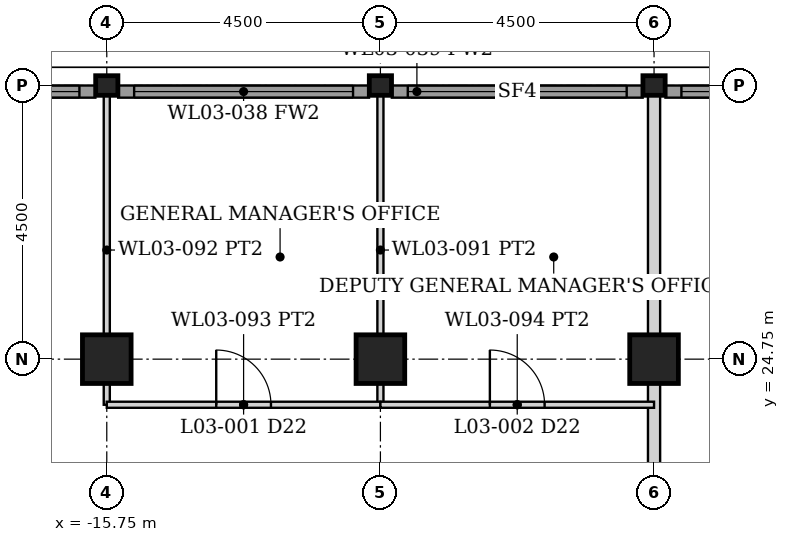
"""IFC4 building model, lengths in metres.
Left out: names, types, materials, properties, quantities, classifications, styles, units other than length and angle.
Written with IfcOpenShell. Run it as: python <this file> out.ifc"""

import sys

from ifc_helpers import new_model, si_unit, direction, frame, frame_2d, origin, origin_2d, place, context, subcontext, project, spatial, rectangle, hollow_rectangle, i_section, extrude, element, fill, save


model = new_model("IFC4")
c1 = context("Model", 3, precision=1e-05, world=origin(), true_north=direction((0.0, 1.0)))
c2 = subcontext(c1, "Body", "Model", "MODEL_VIEW")
j1 = project(units=[si_unit("LENGTHUNIT", "METRE"), si_unit("PLANEANGLEUNIT", "RADIAN")], contexts=[c1])
p1 = place(None, origin())
s1 = spatial("IfcSite", under=j1, at=p1, CompositionType="ELEMENT")
p2 = place(p1, origin())
s2 = spatial("IfcBuilding", under=s1, at=p2, CompositionType="ELEMENT")
p3 = place(p2, frame((0.0, 0.0, 16.0)))
s3 = spatial("IfcBuildingStorey", under=s2, at=p3, CompositionType="ELEMENT", Elevation=16.0)
for number, where, z_axis, x_axis in (
    (1, (-15.75, 24.75, 0.0), (0.0, 0.0, 1.0), (0.0, 1.0, 0.0)),
    (2, (-11.25, 24.75, 0.0), (0.0, 0.0, 1.0), (0.0, 1.0, 0.0)),
    (3, (-6.75, 24.75, 0.0), (0.0, 0.0, 1.0), (0.0, 1.0, 0.0)),
):
    element("IfcColumn", number, at=place(p3, frame(where, z_axis=z_axis, x_axis=x_axis)), inside=s3, PredefinedType="COLUMN", context=c2, shape_type="SweptSolid", body=[
        extrude(hollow_rectangle(XDim=0.8, YDim=0.8, WallThickness=0.08, at=origin_2d()), origin(), (0.0, 0.0, 1.0), 5.5),
    ])
for number, where, z_axis, x_axis in (
    (4, (-15.75, 29.25, 0.0), (0.0, 0.0, 1.0), (0.0, 1.0, 0.0)),
    (5, (-11.25, 29.25, 0.0), (0.0, 0.0, 1.0), (0.0, 1.0, 0.0)),
    (6, (-6.75, 29.25, 0.0), (0.0, 0.0, 1.0), (0.0, 1.0, 0.0)),
):
    element("IfcColumn", number, at=place(p3, frame(where, z_axis=z_axis, x_axis=x_axis)), inside=s3, PredefinedType="COLUMN", context=c2, shape_type="SweptSolid", body=[
        extrude(i_section(OverallWidth=0.322, OverallDepth=0.365, WebThickness=0.027, FlangeThickness=0.044, FilletRadius=0.015, at=origin_2d()), origin(), (0.0, 0.0, 1.0), 5.5),
    ])
p4 = place(p3, frame((-20.062, 29.15, 0.0), z_axis=(0.0, 0.0, 1.0), x_axis=(1.0, 0.0, 0.0)))
e7 = element("IfcWall", 7, at=p4, inside=s3, PredefinedType="SOLIDWALL", context=c2, shape_type="SweptSolid", body=[
    extrude(rectangle(XDim=4.125, YDim=0.2, at=frame_2d((2.062, 0.0))), origin(), (0.0, 0.0, 1.0), 4.633),
])
p5 = place(p4, frame((0.262, 0.0, 0.15)))
e8 = element("IfcOpeningElement", 8, at=p5, cuts=e7, PredefinedType="OPENING", context=c2, shape_type="SweptSolid", body=[
    extrude(rectangle(XDim=3.6, YDim=4.333, at=frame_2d((1.8, 2.167))), frame((0.0, 0.11, 0.0), z_axis=(0.0, -1.0, 0.0), x_axis=(1.0, 0.0, 0.0)), (0.0, 0.0, 1.0), 0.22),
])
p6 = place(p3, frame((-15.562, 29.15, 0.0), z_axis=(0.0, 0.0, 1.0), x_axis=(1.0, 0.0, 0.0)))
e9 = element("IfcWall", 9, at=p6, inside=s3, PredefinedType="SOLIDWALL", context=c2, shape_type="SweptSolid", body=[
    extrude(rectangle(XDim=4.125, YDim=0.2, at=frame_2d((2.062, 0.0))), origin(), (0.0, 0.0, 1.0), 4.633),
])
p7 = place(p6, frame((0.262, 0.0, 0.15)))
e10 = element("IfcOpeningElement", 10, at=p7, cuts=e9, PredefinedType="OPENING", context=c2, shape_type="SweptSolid", body=[
    extrude(rectangle(XDim=3.6, YDim=4.333, at=frame_2d((1.8, 2.167))), frame((0.0, 0.11, 0.0), z_axis=(0.0, -1.0, 0.0), x_axis=(1.0, 0.0, 0.0)), (0.0, 0.0, 1.0), 0.22),
])
p8 = place(p3, frame((-11.062, 29.15, 0.0), z_axis=(0.0, 0.0, 1.0), x_axis=(1.0, 0.0, 0.0)))
e11 = element("IfcWall", 11, at=p8, inside=s3, PredefinedType="SOLIDWALL", context=c2, shape_type="SweptSolid", body=[
    extrude(rectangle(XDim=4.125, YDim=0.2, at=frame_2d((2.062, 0.0))), origin(), (0.0, 0.0, 1.0), 4.633),
])
p9 = place(p8, frame((0.262, 0.0, 0.15)))
e12 = element("IfcOpeningElement", 12, at=p9, cuts=e11, PredefinedType="OPENING", context=c2, shape_type="SweptSolid", body=[
    extrude(rectangle(XDim=3.6, YDim=4.333, at=frame_2d((1.8, 2.167))), frame((0.0, 0.11, 0.0), z_axis=(0.0, -1.0, 0.0), x_axis=(1.0, 0.0, 0.0)), (0.0, 0.0, 1.0), 0.22),
])
p10 = place(p3, frame((-6.562, 29.15, 0.0), z_axis=(0.0, 0.0, 1.0), x_axis=(1.0, 0.0, 0.0)))
e13 = element("IfcWall", 13, at=p10, inside=s3, PredefinedType="SOLIDWALL", context=c2, shape_type="SweptSolid", body=[
    extrude(rectangle(XDim=4.125, YDim=0.2, at=frame_2d((2.062, 0.0))), origin(), (0.0, 0.0, 1.0), 4.633),
])
p11 = place(p10, frame((0.262, 0.0, 0.15)))
e14 = element("IfcOpeningElement", 14, at=p11, cuts=e13, PredefinedType="OPENING", context=c2, shape_type="SweptSolid", body=[
    extrude(rectangle(XDim=3.6, YDim=4.333, at=frame_2d((1.8, 2.167))), frame((0.0, 0.11, 0.0), z_axis=(0.0, -1.0, 0.0), x_axis=(1.0, 0.0, 0.0)), (0.0, 0.0, 1.0), 0.22),
])
p12 = place(p3, frame((-6.75, 9.2, 0.0), z_axis=(0.0, 0.0, 1.0), x_axis=(0.0, 1.0, 0.0)))
e15 = element("IfcWall", 15, at=p12, inside=s3, PredefinedType="PARTITIONING", context=c2, shape_type="SweptSolid", body=[
    extrude(rectangle(XDim=19.889, YDim=0.2, at=frame_2d((9.944, 0.0))), origin(), (0.0, 0.0, 1.0), 4.329),
])
for number, where, z_axis, x_axis in (
    (16, (-15.75, 24.0, 0.0), (0.0, 0.0, 1.0), (0.0, 1.0, 0.0)),
    (17, (-11.25, 24.0, 0.0), (0.0, 0.0, 1.0), (0.0, 1.0, 0.0)),
):
    element("IfcWall", number, at=place(p3, frame(where, z_axis=z_axis, x_axis=x_axis)), inside=s3, PredefinedType="PARTITIONING", context=c2, shape_type="SweptSolid", body=[
        extrude(rectangle(XDim=5.089, YDim=0.1, at=frame_2d((2.544, 0.0))), origin(), (0.0, 0.0, 1.0), 4.329),
    ])
p13 = place(p3, frame((-15.75, 24.0, 0.0), z_axis=(0.0, 0.0, 1.0), x_axis=(1.0, 0.0, 0.0)))
e18 = element("IfcWall", 18, at=p13, inside=s3, PredefinedType="PARTITIONING", context=c2, shape_type="SweptSolid", body=[
    extrude(rectangle(XDim=4.5, YDim=0.1, at=frame_2d((2.25, 0.0))), origin(), (0.0, 0.0, 1.0), 4.329),
])
p14 = place(p13, frame((1.8, 0.0, 0.0)))
e19 = element("IfcOpeningElement", 19, at=p14, cuts=e18, PredefinedType="OPENING", context=c2, shape_type="SweptSolid", body=[
    extrude(rectangle(XDim=0.9, YDim=2.1, at=frame_2d((0.45, 1.05))), frame((0.0, 0.06, 0.0), z_axis=(0.0, -1.0, 0.0), x_axis=(1.0, 0.0, 0.0)), (0.0, 0.0, 1.0), 0.12),
])
p15 = place(p3, frame((-11.25, 24.0, 0.0), z_axis=(0.0, 0.0, 1.0), x_axis=(1.0, 0.0, 0.0)))
e20 = element("IfcWall", 20, at=p15, inside=s3, PredefinedType="PARTITIONING", context=c2, shape_type="SweptSolid", body=[
    extrude(rectangle(XDim=4.5, YDim=0.1, at=frame_2d((2.25, 0.0))), origin(), (0.0, 0.0, 1.0), 4.329),
])
p16 = place(p15, frame((1.8, 0.0, 0.0)))
e21 = element("IfcOpeningElement", 21, at=p16, cuts=e20, PredefinedType="OPENING", context=c2, shape_type="SweptSolid", body=[
    extrude(rectangle(XDim=0.9, YDim=2.1, at=frame_2d((0.45, 1.05))), frame((0.0, 0.06, 0.0), z_axis=(0.0, -1.0, 0.0), x_axis=(1.0, 0.0, 0.0)), (0.0, 0.0, 1.0), 0.12),
])
p17 = place(p5, origin())
e22 = element("IfcWindow", 22, at=p17, inside=s3, PartitioningType="SINGLE_PANEL", PredefinedType="WINDOW", context=c2, shape_type="SweptSolid", body=[
    extrude(rectangle(XDim=3.6, YDim=4.333, at=frame_2d((1.8, 2.167))), frame((0.0, 0.03, 0.0), z_axis=(0.0, -1.0, 0.0), x_axis=(1.0, 0.0, 0.0)), (0.0, 0.0, 1.0), 0.06),
])
fill(e8, e22)
p18 = place(p7, origin())
e23 = element("IfcWindow", 23, at=p18, inside=s3, PartitioningType="SINGLE_PANEL", PredefinedType="WINDOW", context=c2, shape_type="SweptSolid", body=[
    extrude(rectangle(XDim=3.6, YDim=4.333, at=frame_2d((1.8, 2.167))), frame((0.0, 0.03, 0.0), z_axis=(0.0, -1.0, 0.0), x_axis=(1.0, 0.0, 0.0)), (0.0, 0.0, 1.0), 0.06),
])
fill(e10, e23)
p19 = place(p9, origin())
e24 = element("IfcWindow", 24, at=p19, inside=s3, PartitioningType="SINGLE_PANEL", PredefinedType="WINDOW", context=c2, shape_type="SweptSolid", body=[
    extrude(rectangle(XDim=3.6, YDim=4.333, at=frame_2d((1.8, 2.167))), frame((0.0, 0.03, 0.0), z_axis=(0.0, -1.0, 0.0), x_axis=(1.0, 0.0, 0.0)), (0.0, 0.0, 1.0), 0.06),
])
fill(e12, e24)
p20 = place(p11, origin())
e25 = element("IfcWindow", 25, at=p20, inside=s3, PartitioningType="SINGLE_PANEL", PredefinedType="WINDOW", context=c2, shape_type="SweptSolid", body=[
    extrude(rectangle(XDim=3.6, YDim=4.333, at=frame_2d((1.8, 2.167))), frame((0.0, 0.03, 0.0), z_axis=(0.0, -1.0, 0.0), x_axis=(1.0, 0.0, 0.0)), (0.0, 0.0, 1.0), 0.06),
])
fill(e14, e25)
p21 = place(p14, origin())
e26 = element("IfcDoor", 26, at=p21, inside=s3, OperationType="SINGLE_SWING_LEFT", PredefinedType="DOOR", context=c2, shape_type="SweptSolid", body=[
    extrude(rectangle(XDim=0.9, YDim=2.1, at=frame_2d((0.45, 1.05))), frame((0.0, 0.025, 0.0), z_axis=(0.0, -1.0, 0.0), x_axis=(1.0, 0.0, 0.0)), (0.0, 0.0, 1.0), 0.05),
])
fill(e19, e26)
p22 = place(p16, origin())
e27 = element("IfcDoor", 27, at=p22, inside=s3, OperationType="SINGLE_SWING_LEFT", PredefinedType="DOOR", context=c2, shape_type="SweptSolid", body=[
    extrude(rectangle(XDim=0.9, YDim=2.1, at=frame_2d((0.45, 1.05))), frame((0.0, 0.025, 0.0), z_axis=(0.0, -1.0, 0.0), x_axis=(1.0, 0.0, 0.0)), (0.0, 0.0, 1.0), 0.05),
])
fill(e21, e27)
save(model, sys.argv[1])
